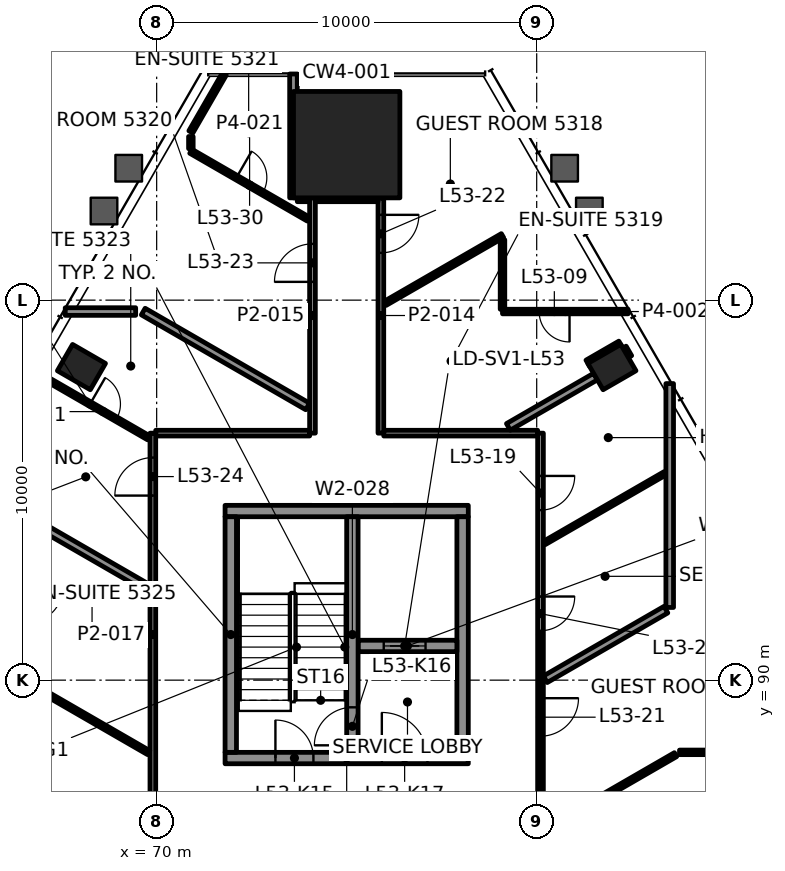
"""IFC4 building model, lengths in metres.
Left out: names, types, materials, properties, quantities, classifications, styles, units other than length and angle.
Written with IfcOpenShell. Run it as: python <this file> out.ifc"""

import sys

from ifc_helpers import new_model, si_unit, direction, frame, frame_2d, origin, origin_2d, place, context, subcontext, project, spatial, rectangle, hollow_rectangle, extrude, element, fill, save


model = new_model("IFC4")
c1 = context("Model", 3, precision=1e-05, world=origin(), true_north=direction((0.0, 1.0)))
c2 = subcontext(c1, "Body", "Model", "MODEL_VIEW")
j1 = project(units=[si_unit("LENGTHUNIT", "METRE"), si_unit("PLANEANGLEUNIT", "RADIAN")], contexts=[c1])
p1 = place(None, origin())
s1 = spatial("IfcSite", under=j1, at=p1, CompositionType="ELEMENT")
p2 = place(p1, origin())
s2 = spatial("IfcBuilding", under=s1, at=p2, CompositionType="ELEMENT")
p3 = place(p2, frame((0.0, 0.0, 226.0)))
s3 = spatial("IfcBuildingStorey", under=s2, at=p3, CompositionType="ELEMENT", Elevation=226.0)
p4 = place(p3, frame((75.0, 104.092, 0.0), z_axis=(0.0, 0.0, 1.0), x_axis=(-1.0, 0.0, 0.0)))
e1 = element("IfcColumn", 1, at=p4, inside=s3, PredefinedType="COLUMN", context=c2, shape_type="SweptSolid", body=[
    extrude(rectangle(XDim=2.8, YDim=2.8, at=origin_2d()), origin(), (0.0, 0.0, 1.0), 3.9),
])
for number, where, z_axis, x_axis in (
    (2, (81.979, 98.238, -0.0), (0.0, 0.0, 1.0), (-0.5, 0.866, 0.0)),
    (3, (68.021, 98.238, -0.0), (0.0, 0.0, 1.0), (-0.5, -0.866, 0.0)),
):
    element("IfcColumn", number, at=place(p3, frame(where, z_axis=z_axis, x_axis=x_axis)), inside=s3, PredefinedType="COLUMN", context=c2, shape_type="SweptSolid", body=[
        extrude(hollow_rectangle(XDim=0.8, YDim=1.0, WallThickness=0.05, at=origin_2d()), origin(), (0.0, 0.0, 1.0), 3.9),
    ])
p5 = place(p3, frame((71.8, 87.95, 0.0), z_axis=(0.0, 0.0, 1.0), x_axis=(1.0, 0.0, 0.0)))
e4 = element("IfcWall", 4, at=p5, inside=s3, PredefinedType="SHEAR", context=c2, shape_type="SweptSolid", body=[
    extrude(rectangle(XDim=6.4, YDim=0.3, at=frame_2d((3.2, 0.0))), origin(), (0.0, 0.0, 1.0), 3.7),
])
p6 = place(p5, frame((1.325, 0.0, 0.0)))
e5 = element("IfcOpeningElement", 5, at=p6, cuts=e4, PredefinedType="OPENING", context=c2, shape_type="SweptSolid", body=[
    extrude(rectangle(XDim=1.0, YDim=2.1, at=frame_2d((0.5, 1.05))), frame((0.0, 0.16, 0.0), z_axis=(0.0, -1.0, 0.0), x_axis=(1.0, 0.0, 0.0)), (0.0, 0.0, 1.0), 0.32),
])
p7 = place(p5, frame((4.125, 0.0, 0.0)))
e6 = element("IfcOpeningElement", 6, at=p7, cuts=e4, PredefinedType="OPENING", context=c2, shape_type="SweptSolid", body=[
    extrude(rectangle(XDim=1.2, YDim=2.1, at=frame_2d((0.6, 1.05))), frame((0.0, 0.16, 0.0), z_axis=(0.0, -1.0, 0.0), x_axis=(1.0, 0.0, 0.0)), (0.0, 0.0, 1.0), 0.32),
])
p8 = place(p3, frame((71.8, 94.45, 0.0), z_axis=(0.0, 0.0, 1.0), x_axis=(1.0, 0.0, 0.0)))
e7 = element("IfcWall", 7, at=p8, inside=s3, PredefinedType="SHEAR", context=c2, shape_type="SweptSolid", body=[
    extrude(rectangle(XDim=6.4, YDim=0.3, at=frame_2d((3.2, 0.0))), origin(), (0.0, 0.0, 1.0), 3.7),
])
for number, where, z_axis, x_axis in (
    (8, (71.95, 88.1, 0.0), (0.0, 0.0, 1.0), (0.0, 1.0, 0.0)),
    (9, (78.05, 88.1, 0.0), (0.0, 0.0, 1.0), (0.0, 1.0, 0.0)),
):
    element("IfcWall", number, at=place(p3, frame(where, z_axis=z_axis, x_axis=x_axis)), inside=s3, PredefinedType="SHEAR", context=c2, shape_type="SweptSolid", body=[
        extrude(rectangle(XDim=6.2, YDim=0.3, at=frame_2d((3.1, 0.0))), origin(), (0.0, 0.0, 1.0), 3.7),
    ])
p9 = place(p3, frame((75.3, 90.9, 0.0), z_axis=(0.0, 0.0, 1.0), x_axis=(1.0, 0.0, 0.0)))
e10 = element("IfcWall", 10, at=p9, inside=s3, PredefinedType="SHEAR", context=c2, shape_type="SweptSolid", body=[
    extrude(rectangle(XDim=2.6, YDim=0.3, at=frame_2d((1.3, 0.0))), origin(), (0.0, 0.0, 1.0), 3.7),
])
p10 = place(p9, frame((0.675, 0.0, 0.0)))
e11 = element("IfcOpeningElement", 11, at=p10, cuts=e10, PredefinedType="OPENING", context=c2, shape_type="SweptSolid", body=[
    extrude(rectangle(XDim=1.1, YDim=2.1, at=frame_2d((0.55, 1.05))), frame((0.0, 0.16, 0.0), z_axis=(0.0, -1.0, 0.0), x_axis=(1.0, 0.0, 0.0)), (0.0, 0.0, 1.0), 0.32),
])
p11 = place(p3, frame((75.15, 88.1, 0.0), z_axis=(0.0, 0.0, 1.0), x_axis=(0.0, 1.0, 0.0)))
e12 = element("IfcWall", 12, at=p11, inside=s3, PredefinedType="SHEAR", context=c2, shape_type="SweptSolid", body=[
    extrude(rectangle(XDim=6.2, YDim=0.3, at=frame_2d((3.1, 0.0))), origin(), (0.0, 0.0, 1.0), 3.7),
])
p12 = place(p11, frame((0.185, 0.0, 0.0)))
e13 = element("IfcOpeningElement", 13, at=p12, cuts=e12, PredefinedType="OPENING", context=c2, shape_type="SweptSolid", body=[
    extrude(rectangle(XDim=1.0, YDim=2.1, at=frame_2d((0.5, 1.05))), frame((0.0, 0.16, 0.0), z_axis=(0.0, -1.0, 0.0), x_axis=(1.0, 0.0, 0.0)), (0.0, 0.0, 1.0), 0.32),
])
p13 = place(p3, frame((88.941, 88.1, 0.0), z_axis=(0.0, 0.0, 1.0), x_axis=(-1.0, 0.0, 0.0)))
e14 = element("IfcWall", 14, at=p13, inside=s3, PredefinedType="PARTITIONING", context=c2, shape_type="SweptSolid", body=[
    extrude(rectangle(XDim=5.183, YDim=0.12, at=frame_2d((2.592, 0.0))), origin(), (0.0, 0.0, 1.0), 3.022),
])
p14 = place(p13, frame((2.399, 0.0, 0.0)))
e15 = element("IfcOpeningElement", 15, at=p14, cuts=e14, PredefinedType="OPENING", context=c2, shape_type="SweptSolid", body=[
    extrude(rectangle(XDim=0.8, YDim=2.1, at=frame_2d((0.4, 1.05))), frame((0.0, 0.07, 0.0), z_axis=(0.0, -1.0, 0.0), x_axis=(1.0, 0.0, 0.0)), (0.0, 0.0, 1.0), 0.14),
])
for number, where, z_axis, x_axis in (
    (16, (69.976, 96.5, 0.0), (0.0, 0.0, 1.0), (1.0, 0.0, 0.0)),
    (17, (75.975, 96.5, 0.0), (0.0, 0.0, 1.0), (1.0, 0.0, 0.0)),
):
    element("IfcWall", number, at=place(p3, frame(where, z_axis=z_axis, x_axis=x_axis)), inside=s3, PredefinedType="PARTITIONING", context=c2, shape_type="SweptSolid", body=[
        extrude(rectangle(XDim=4.049, YDim=0.15, at=frame_2d((2.025, 0.0))), origin(), (0.0, 0.0, 1.0), 3.1),
    ])
p15 = place(p3, frame((67.594, 99.7, 0.0), z_axis=(0.0, 0.0, 1.0), x_axis=(1.0, 0.0, 0.0)))
e18 = element("IfcWall", 18, at=p15, inside=s3, PredefinedType="PARTITIONING", context=c2, shape_type="SweptSolid", body=[
    extrude(rectangle(XDim=1.853, YDim=0.2, at=frame_2d((0.927, 0.0))), origin(), (0.0, 0.0, 1.0), 3.1),
])
p16 = place(p3, frame((82.406, 99.7, 0.0), z_axis=(0.0, 0.0, 1.0), x_axis=(-1.0, 0.0, 0.0)))
e19 = element("IfcWall", 19, at=p16, inside=s3, PredefinedType="PARTITIONING", context=c2, shape_type="SweptSolid", body=[
    extrude(rectangle(XDim=3.305, YDim=0.12, at=frame_2d((1.653, 0.0))), origin(), (0.0, 0.0, 1.0), 3.1),
])
p17 = place(p16, frame((1.542, 0.0, 0.0)))
e20 = element("IfcOpeningElement", 20, at=p17, cuts=e19, PredefinedType="OPENING", context=c2, shape_type="SweptSolid", body=[
    extrude(rectangle(XDim=0.8, YDim=2.1, at=frame_2d((0.4, 1.05))), frame((0.0, 0.07, 0.0), z_axis=(0.0, -1.0, 0.0), x_axis=(1.0, 0.0, 0.0)), (0.0, 0.0, 1.0), 0.14),
])
p18 = place(p3, frame((73.7, 102.691, 0.0), z_axis=(0.0, 0.0, 1.0), x_axis=(1.0, 0.0, 0.0)))
e21 = element("IfcWall", 21, at=p18, inside=s3, PredefinedType="PARTITIONING", context=c2, shape_type="SweptSolid", body=[
    extrude(rectangle(XDim=0.324, YDim=0.2, at=frame_2d((0.162, 0.0))), origin(), (0.0, 0.0, 1.0), 3.1),
])
p19 = place(p3, frame((84.115, 85.065, 0.0), z_axis=(0.0, 0.0, 1.0), x_axis=(0.866027152591, 0.499996970966, 0.0)))
e22 = element("IfcWall", 22, at=p19, inside=s3, PredefinedType="PARTITIONING", context=c2, shape_type="SweptSolid", body=[
    extrude(rectangle(XDim=5.697, YDim=0.2, at=frame_2d((2.848, 0.0))), origin(), (0.0, 0.0, 1.0), 3.022),
])
p20 = place(p3, frame((80.209, 86.052, 0.0), z_axis=(0.0, 0.0, 1.0), x_axis=(0.866032250876, 0.499988140302, 0.0)))
e23 = element("IfcWall", 23, at=p20, inside=s3, PredefinedType="PARTITIONING", context=c2, shape_type="SweptSolid", body=[
    extrude(rectangle(XDim=3.977, YDim=0.12, at=frame_2d((1.989, 0.0))), origin(), (0.0, 0.0, 1.0), 3.1),
])
p21 = place(p3, frame((80.227, 90.023, 0.0), z_axis=(0.0, 0.0, 1.0), x_axis=(0.866020252061, 0.500008922941, 0.0)))
e24 = element("IfcWall", 24, at=p21, inside=s3, PredefinedType="PARTITIONING", context=c2, shape_type="SweptSolid", body=[
    extrude(rectangle(XDim=3.664, YDim=0.2, at=frame_2d((1.832, 0.0))), origin(), (0.0, 0.0, 1.0), 3.1),
])
p22 = place(p3, frame((80.201, 93.61, 0.0), z_axis=(0.0, 0.0, 1.0), x_axis=(0.866020252061, 0.500008922941, 0.0)))
e25 = element("IfcWall", 25, at=p22, inside=s3, PredefinedType="PARTITIONING", context=c2, shape_type="SweptSolid", body=[
    extrude(rectangle(XDim=3.664, YDim=0.1, at=frame_2d((1.832, 0.0))), origin(), (0.0, 0.0, 1.0), 3.1),
])
p23 = place(p3, frame((79.255, 96.665, 0.0), z_axis=(0.0, 0.0, 1.0), x_axis=(0.866048852527, 0.499959383386, 0.0)))
e26 = element("IfcWall", 26, at=p23, inside=s3, PredefinedType="PARTITIONING", context=c2, shape_type="SweptSolid", body=[
    extrude(rectangle(XDim=2.646, YDim=0.2, at=frame_2d((1.323, 0.0))), origin(), (0.0, 0.0, 1.0), 3.1),
])
p24 = place(p3, frame((81.346, 98.334, 0.0), z_axis=(0.0, 0.0, 1.0), x_axis=(0.866010750942, 0.50002537861, 0.0)))
e27 = element("IfcWall", 27, at=p24, inside=s3, PredefinedType="PARTITIONING", context=c2, shape_type="SweptSolid", body=[
    extrude(rectangle(XDim=1.0, YDim=0.2, at=frame_2d((0.5, 0.0))), origin(), (0.0, 0.0, 1.0), 3.1),
])
p25 = place(p3, frame((76.01, 99.914, 0.0), z_axis=(0.0, 0.0, 1.0), x_axis=(0.866028357664, 0.499994883695, 0.0)))
e28 = element("IfcWall", 28, at=p25, inside=s3, PredefinedType="PARTITIONING", context=c2, shape_type="SweptSolid", body=[
    extrude(rectangle(XDim=3.568, YDim=0.12, at=frame_2d((1.784, 0.0))), origin(), (0.0, 0.0, 1.0), 3.1),
])
p26 = place(p3, frame((70.9, 104.426, 0.0), z_axis=(0.0, 0.0, 1.0), x_axis=(0.500014360914, 0.866017112348, 0.0)))
e29 = element("IfcWall", 29, at=p26, inside=s3, PredefinedType="PARTITIONING", context=c2, shape_type="SweptSolid", body=[
    extrude(rectangle(XDim=1.762, YDim=0.12, at=frame_2d((0.881, 0.0))), origin(), (0.0, 0.0, 1.0), 3.1),
])
p27 = place(p3, frame((83.5, 91.913, 0.0), z_axis=(0.0, 0.0, 1.0), x_axis=(0.0, 1.0, 0.0)))
e30 = element("IfcWall", 30, at=p27, inside=s3, PredefinedType="PARTITIONING", context=c2, shape_type="SweptSolid", body=[
    extrude(rectangle(XDim=5.892, YDim=0.2, at=frame_2d((2.946, 0.0))), origin(), (0.0, 0.0, 1.0), 3.022),
])
p28 = place(p3, frame((80.1, 96.5, 0.0), z_axis=(0.0, 0.0, 1.0), x_axis=(0.0, -1.0, 0.0)))
e31 = element("IfcWall", 31, at=p28, inside=s3, PredefinedType="PARTITIONING", context=c2, shape_type="SweptSolid", body=[
    extrude(rectangle(XDim=10.6, YDim=0.15, at=frame_2d((5.3, 0.0))), origin(), (0.0, 0.0, 1.0), 3.1),
])
p29 = place(p28, frame((1.125, 0.0, 0.0)))
e32 = element("IfcOpeningElement", 32, at=p29, cuts=e31, PredefinedType="OPENING", context=c2, shape_type="SweptSolid", body=[
    extrude(rectangle(XDim=0.9, YDim=2.1, at=frame_2d((0.45, 1.05))), frame((0.0, 0.085, 0.0), z_axis=(0.0, -1.0, 0.0), x_axis=(1.0, 0.0, 0.0)), (0.0, 0.0, 1.0), 0.17),
])
p30 = place(p28, frame((4.299, 0.0, 0.0)))
e33 = element("IfcOpeningElement", 33, at=p30, cuts=e31, PredefinedType="OPENING", context=c2, shape_type="SweptSolid", body=[
    extrude(rectangle(XDim=0.9, YDim=2.1, at=frame_2d((0.45, 1.05))), frame((0.0, 0.085, 0.0), z_axis=(0.0, -1.0, 0.0), x_axis=(1.0, 0.0, 0.0)), (0.0, 0.0, 1.0), 0.17),
])
p31 = place(p28, frame((6.974, 0.0, 0.0)))
e34 = element("IfcOpeningElement", 34, at=p31, cuts=e31, PredefinedType="OPENING", context=c2, shape_type="SweptSolid", body=[
    extrude(rectangle(XDim=1.0, YDim=2.1, at=frame_2d((0.5, 1.05))), frame((0.0, 0.085, 0.0), z_axis=(0.0, -1.0, 0.0), x_axis=(1.0, 0.0, 0.0)), (0.0, 0.0, 1.0), 0.17),
])
p32 = place(p3, frame((79.1, 99.76, 0.0), z_axis=(0.0, 0.0, 1.0), x_axis=(0.0, 1.0, 0.0)))
e35 = element("IfcWall", 35, at=p32, inside=s3, PredefinedType="PARTITIONING", context=c2, shape_type="SweptSolid", body=[
    extrude(rectangle(XDim=1.829, YDim=0.12, at=frame_2d((0.915, 0.0))), origin(), (0.0, 0.0, 1.0), 3.1),
])
p33 = place(p3, frame((75.9, 102.691, 0.0), z_axis=(0.0, 0.0, 1.0), x_axis=(0.0, -1.0, 0.0)))
e36 = element("IfcWall", 36, at=p33, inside=s3, PredefinedType="PARTITIONING", context=c2, shape_type="SweptSolid", body=[
    extrude(rectangle(XDim=6.191, YDim=0.15, at=frame_2d((3.095, 0.0))), origin(), (0.0, 0.0, 1.0), 3.1),
])
p34 = place(p33, frame((0.447, 0.0, 0.0)))
e37 = element("IfcOpeningElement", 37, at=p34, cuts=e36, PredefinedType="OPENING", context=c2, shape_type="SweptSolid", body=[
    extrude(rectangle(XDim=1.0, YDim=2.1, at=frame_2d((0.5, 1.05))), frame((0.0, 0.085, 0.0), z_axis=(0.0, -1.0, 0.0), x_axis=(1.0, 0.0, 0.0)), (0.0, 0.0, 1.0), 0.17),
])
p35 = place(p3, frame((74.1, 96.5, 0.0), z_axis=(0.0, 0.0, 1.0), x_axis=(0.0, 1.0, 0.0)))
e38 = element("IfcWall", 38, at=p35, inside=s3, PredefinedType="PARTITIONING", context=c2, shape_type="SweptSolid", body=[
    extrude(rectangle(XDim=6.191, YDim=0.15, at=frame_2d((3.096, 0.0))), origin(), (0.0, 0.0, 1.0), 3.1),
])
p36 = place(p35, frame((3.981, 0.0, 0.0)))
e39 = element("IfcOpeningElement", 39, at=p36, cuts=e38, PredefinedType="OPENING", context=c2, shape_type="SweptSolid", body=[
    extrude(rectangle(XDim=1.0, YDim=2.1, at=frame_2d((0.5, 1.05))), frame((0.0, 0.085, 0.0), z_axis=(0.0, -1.0, 0.0), x_axis=(1.0, 0.0, 0.0)), (0.0, 0.0, 1.0), 0.17),
])
p37 = place(p3, frame((73.6, 102.692, 0.0), z_axis=(0.0, 0.0, 1.0), x_axis=(0.0, 1.0, 0.0)))
e40 = element("IfcWall", 40, at=p37, inside=s3, PredefinedType="PARTITIONING", context=c2, shape_type="SweptSolid", body=[
    extrude(rectangle(XDim=3.26, YDim=0.2, at=frame_2d((1.63, 0.0))), origin(), (0.0, 0.0, 1.0), 3.1),
])
p38 = place(p3, frame((70.9, 103.986, 0.0), z_axis=(0.0, 0.0, 1.0), x_axis=(0.0, 1.0, 0.0)))
e41 = element("IfcWall", 41, at=p38, inside=s3, PredefinedType="PARTITIONING", context=c2, shape_type="SweptSolid", body=[
    extrude(rectangle(XDim=0.319, YDim=0.12, at=frame_2d((0.16, 0.0))), origin(), (0.0, 0.0, 1.0), 3.1),
])
p39 = place(p3, frame((69.9, 85.9, 0.0), z_axis=(0.0, 0.0, 1.0), x_axis=(0.0, 1.0, 0.0)))
e42 = element("IfcWall", 42, at=p39, inside=s3, PredefinedType="PARTITIONING", context=c2, shape_type="SweptSolid", body=[
    extrude(rectangle(XDim=10.599, YDim=0.15, at=frame_2d((5.3, 0.0))), origin(), (0.0, 0.0, 1.0), 3.1),
])
p40 = place(p39, frame((8.956, 0.0, 0.0)))
e43 = element("IfcOpeningElement", 43, at=p40, cuts=e42, PredefinedType="OPENING", context=c2, shape_type="SweptSolid", body=[
    extrude(rectangle(XDim=1.0, YDim=2.1, at=frame_2d((0.5, 1.05))), frame((0.0, 0.085, 0.0), z_axis=(0.0, -1.0, 0.0), x_axis=(1.0, 0.0, 0.0)), (0.0, 0.0, 1.0), 0.17),
])
p41 = place(p3, frame((82.412, 98.488, 0.0), z_axis=(0.0, 0.0, 1.0), x_axis=(-0.499941024108, 0.866059450854, 0.0)))
e44 = element("IfcWall", 44, at=p41, inside=s3, PredefinedType="PARTITIONING", context=c2, shape_type="SweptSolid", body=[
    extrude(rectangle(XDim=0.29, YDim=0.2, at=frame_2d((0.145, 0.0))), origin(), (0.0, 0.0, 1.0), 3.1),
])
p42 = place(p3, frame((70.9, 103.917, 0.0), z_axis=(0.0, 0.0, 1.0), x_axis=(0.866028357664, -0.499994883695, 0.0)))
e45 = element("IfcWall", 45, at=p42, inside=s3, PredefinedType="PARTITIONING", context=c2, shape_type="SweptSolid", body=[
    extrude(rectangle(XDim=3.568, YDim=0.12, at=frame_2d((1.784, 0.0))), origin(), (0.0, 0.0, 1.0), 3.1),
])
p43 = place(p42, frame((1.384, 0.0, 0.0)))
e46 = element("IfcOpeningElement", 46, at=p43, cuts=e45, PredefinedType="OPENING", context=c2, shape_type="SweptSolid", body=[
    extrude(rectangle(XDim=0.8, YDim=2.1, at=frame_2d((0.4, 1.05))), frame((0.0, 0.07, 0.0), z_axis=(0.0, -1.0, 0.0), x_axis=(1.0, 0.0, 0.0)), (0.0, 0.0, 1.0), 0.14),
])
p44 = place(p3, frame((73.973, 97.202, 0.0), z_axis=(0.0, 0.0, 1.0), x_axis=(-0.866035818332, 0.499981961041, 0.0)))
e47 = element("IfcWall", 47, at=p44, inside=s3, PredefinedType="PARTITIONING", context=c2, shape_type="SweptSolid", body=[
    extrude(rectangle(XDim=4.995, YDim=0.2, at=frame_2d((2.498, 0.0))), origin(), (0.0, 0.0, 1.0), 3.1),
])
p45 = place(p3, frame((66.704, 98.158, 0.0), z_axis=(0.0, 0.0, 1.0), x_axis=(0.866021313335, -0.500007084799, 0.0)))
e48 = element("IfcWall", 48, at=p45, inside=s3, PredefinedType="PARTITIONING", context=c2, shape_type="SweptSolid", body=[
    extrude(rectangle(XDim=3.564, YDim=0.12, at=frame_2d((1.782, 0.0))), origin(), (0.0, 0.0, 1.0), 3.022),
])
p46 = place(p45, frame((1.782, 0.0, 0.0)))
e49 = element("IfcOpeningElement", 49, at=p46, cuts=e48, PredefinedType="OPENING", context=c2, shape_type="SweptSolid", body=[
    extrude(rectangle(XDim=0.8, YDim=2.1, at=frame_2d((0.4, 1.05))), frame((0.0, 0.07, 0.0), z_axis=(0.0, -1.0, 0.0), x_axis=(1.0, 0.0, 0.0)), (0.0, 0.0, 1.0), 0.14),
])
p47 = place(p3, frame((69.773, 92.424, 0.0), z_axis=(0.0, 0.0, 1.0), x_axis=(-0.866031780221, 0.499988955525, 0.0)))
e50 = element("IfcWall", 50, at=p47, inside=s3, PredefinedType="PARTITIONING", context=c2, shape_type="SweptSolid", body=[
    extrude(rectangle(XDim=5.524, YDim=0.2, at=frame_2d((2.762, 0.0))), origin(), (0.0, 0.0, 1.0), 3.022),
])
p48 = place(p3, frame((69.79, 88.092, 0.0), z_axis=(0.0, 0.0, 1.0), x_axis=(-0.866045006744, 0.49996604514, 0.0)))
e51 = element("IfcWall", 51, at=p48, inside=s3, PredefinedType="PARTITIONING", context=c2, shape_type="SweptSolid", body=[
    extrude(rectangle(XDim=3.499, YDim=0.12, at=frame_2d((1.75, 0.0))), origin(), (0.0, 0.0, 1.0), 3.1),
])
p49 = place(p3, frame((74.175, 102.691, 0.0), z_axis=(0.0, 0.0, 1.0), x_axis=(1.0, 0.0, 0.0)))
e52 = element("IfcWall", 52, at=p49, inside=s3, PredefinedType="PARTITIONING", context=c2, shape_type="SweptSolid", body=[
    extrude(rectangle(XDim=1.649, YDim=0.2, at=frame_2d((0.825, 0.0))), origin(), (0.0, 0.0, 1.0), 3.097),
])
p50 = place(p17, origin())
e53 = element("IfcDoor", 53, at=p50, inside=s3, OperationType="SINGLE_SWING_LEFT", PredefinedType="DOOR", context=c2, shape_type="SweptSolid", body=[
    extrude(rectangle(XDim=0.8, YDim=2.1, at=frame_2d((0.4, 1.05))), frame((0.0, 0.025, 0.0), z_axis=(0.0, -1.0, 0.0), x_axis=(1.0, 0.0, 0.0)), (0.0, 0.0, 1.0), 0.05),
])
fill(e20, e53)
p51 = place(p29, origin())
e54 = element("IfcDoor", 54, at=p51, inside=s3, OperationType="SINGLE_SWING_LEFT", PredefinedType="DOOR", context=c2, shape_type="SweptSolid", body=[
    extrude(rectangle(XDim=0.9, YDim=2.1, at=frame_2d((0.45, 1.05))), frame((0.0, 0.025, 0.0), z_axis=(0.0, -1.0, 0.0), x_axis=(1.0, 0.0, 0.0)), (0.0, 0.0, 1.0), 0.05),
])
fill(e32, e54)
p52 = place(p30, origin())
e55 = element("IfcDoor", 55, at=p52, inside=s3, OperationType="SINGLE_SWING_RIGHT", PredefinedType="DOOR", context=c2, shape_type="SweptSolid", body=[
    extrude(rectangle(XDim=0.9, YDim=2.1, at=frame_2d((0.45, 1.05))), frame((0.0, 0.025, 0.0), z_axis=(0.0, -1.0, 0.0), x_axis=(1.0, 0.0, 0.0)), (0.0, 0.0, 1.0), 0.05),
])
fill(e33, e55)
p53 = place(p31, origin())
e56 = element("IfcDoor", 56, at=p53, inside=s3, OperationType="SINGLE_SWING_RIGHT", PredefinedType="DOOR", context=c2, shape_type="SweptSolid", body=[
    extrude(rectangle(XDim=1.0, YDim=2.1, at=frame_2d((0.5, 1.05))), frame((0.0, 0.025, 0.0), z_axis=(0.0, -1.0, 0.0), x_axis=(1.0, 0.0, 0.0)), (0.0, 0.0, 1.0), 0.05),
])
fill(e34, e56)
p54 = place(p34, origin())
e57 = element("IfcDoor", 57, at=p54, inside=s3, OperationType="SINGLE_SWING_RIGHT", PredefinedType="DOOR", context=c2, shape_type="SweptSolid", body=[
    extrude(rectangle(XDim=1.0, YDim=2.1, at=frame_2d((0.5, 1.05))), frame((0.0, 0.025, 0.0), z_axis=(0.0, -1.0, 0.0), x_axis=(1.0, 0.0, 0.0)), (0.0, 0.0, 1.0), 0.05),
])
fill(e37, e57)
p55 = place(p36, origin())
e58 = element("IfcDoor", 58, at=p55, inside=s3, OperationType="SINGLE_SWING_LEFT", PredefinedType="DOOR", context=c2, shape_type="SweptSolid", body=[
    extrude(rectangle(XDim=1.0, YDim=2.1, at=frame_2d((0.5, 1.05))), frame((0.0, 0.025, 0.0), z_axis=(0.0, -1.0, 0.0), x_axis=(1.0, 0.0, 0.0)), (0.0, 0.0, 1.0), 0.05),
])
fill(e39, e58)
p56 = place(p40, origin())
e59 = element("IfcDoor", 59, at=p56, inside=s3, OperationType="SINGLE_SWING_LEFT", PredefinedType="DOOR", context=c2, shape_type="SweptSolid", body=[
    extrude(rectangle(XDim=1.0, YDim=2.1, at=frame_2d((0.5, 1.05))), frame((0.0, 0.025, 0.0), z_axis=(0.0, -1.0, 0.0), x_axis=(1.0, 0.0, 0.0)), (0.0, 0.0, 1.0), 0.05),
])
fill(e43, e59)
p57 = place(p43, origin())
e60 = element("IfcDoor", 60, at=p57, inside=s3, OperationType="SINGLE_SWING_LEFT", PredefinedType="DOOR", context=c2, shape_type="SweptSolid", body=[
    extrude(rectangle(XDim=0.8, YDim=2.1, at=frame_2d((0.4, 1.05))), frame((0.0, 0.025, 0.0), z_axis=(0.0, -1.0, 0.0), x_axis=(1.0, 0.0, 0.0)), (0.0, 0.0, 1.0), 0.05),
])
fill(e46, e60)
p58 = place(p46, origin())
e61 = element("IfcDoor", 61, at=p58, inside=s3, OperationType="SINGLE_SWING_LEFT", PredefinedType="DOOR", context=c2, shape_type="SweptSolid", body=[
    extrude(rectangle(XDim=0.8, YDim=2.1, at=frame_2d((0.4, 1.05))), frame((0.0, 0.025, 0.0), z_axis=(0.0, -1.0, 0.0), x_axis=(1.0, 0.0, 0.0)), (0.0, 0.0, 1.0), 0.05),
])
fill(e49, e61)
p59 = place(p10, origin())
e62 = element("IfcDoor", 62, at=p59, inside=s3, OperationType="DOUBLE_DOOR_SLIDING", PredefinedType="DOOR", context=c2, shape_type="SweptSolid", body=[
    extrude(rectangle(XDim=1.1, YDim=2.1, at=frame_2d((0.55, 1.05))), frame((0.0, 0.025, 0.0), z_axis=(0.0, -1.0, 0.0), x_axis=(1.0, 0.0, 0.0)), (0.0, 0.0, 1.0), 0.05),
])
fill(e11, e62)
p60 = place(p6, origin())
e63 = element("IfcDoor", 63, at=p60, inside=s3, OperationType="SINGLE_SWING_RIGHT", PredefinedType="DOOR", context=c2, shape_type="SweptSolid", body=[
    extrude(rectangle(XDim=1.0, YDim=2.1, at=frame_2d((0.5, 1.05))), frame((0.0, 0.025, 0.0), z_axis=(0.0, -1.0, 0.0), x_axis=(1.0, 0.0, 0.0)), (0.0, 0.0, 1.0), 0.05),
])
fill(e5, e63)
p61 = place(p12, origin())
e64 = element("IfcDoor", 64, at=p61, inside=s3, OperationType="SINGLE_SWING_LEFT", PredefinedType="DOOR", context=c2, shape_type="SweptSolid", body=[
    extrude(rectangle(XDim=1.0, YDim=2.1, at=frame_2d((0.5, 1.05))), frame((0.0, 0.025, 0.0), z_axis=(0.0, -1.0, 0.0), x_axis=(1.0, 0.0, 0.0)), (0.0, 0.0, 1.0), 0.05),
])
fill(e13, e64)
p62 = place(p7, origin())
e65 = element("IfcDoor", 65, at=p62, inside=s3, OperationType="SINGLE_SWING_RIGHT", PredefinedType="DOOR", context=c2, shape_type="SweptSolid", body=[
    extrude(rectangle(XDim=1.2, YDim=2.1, at=frame_2d((0.6, 1.05))), frame((0.0, 0.025, 0.0), z_axis=(0.0, -1.0, 0.0), x_axis=(1.0, 0.0, 0.0)), (0.0, 0.0, 1.0), 0.05),
])
fill(e6, e65)
save(model, sys.argv[1])
